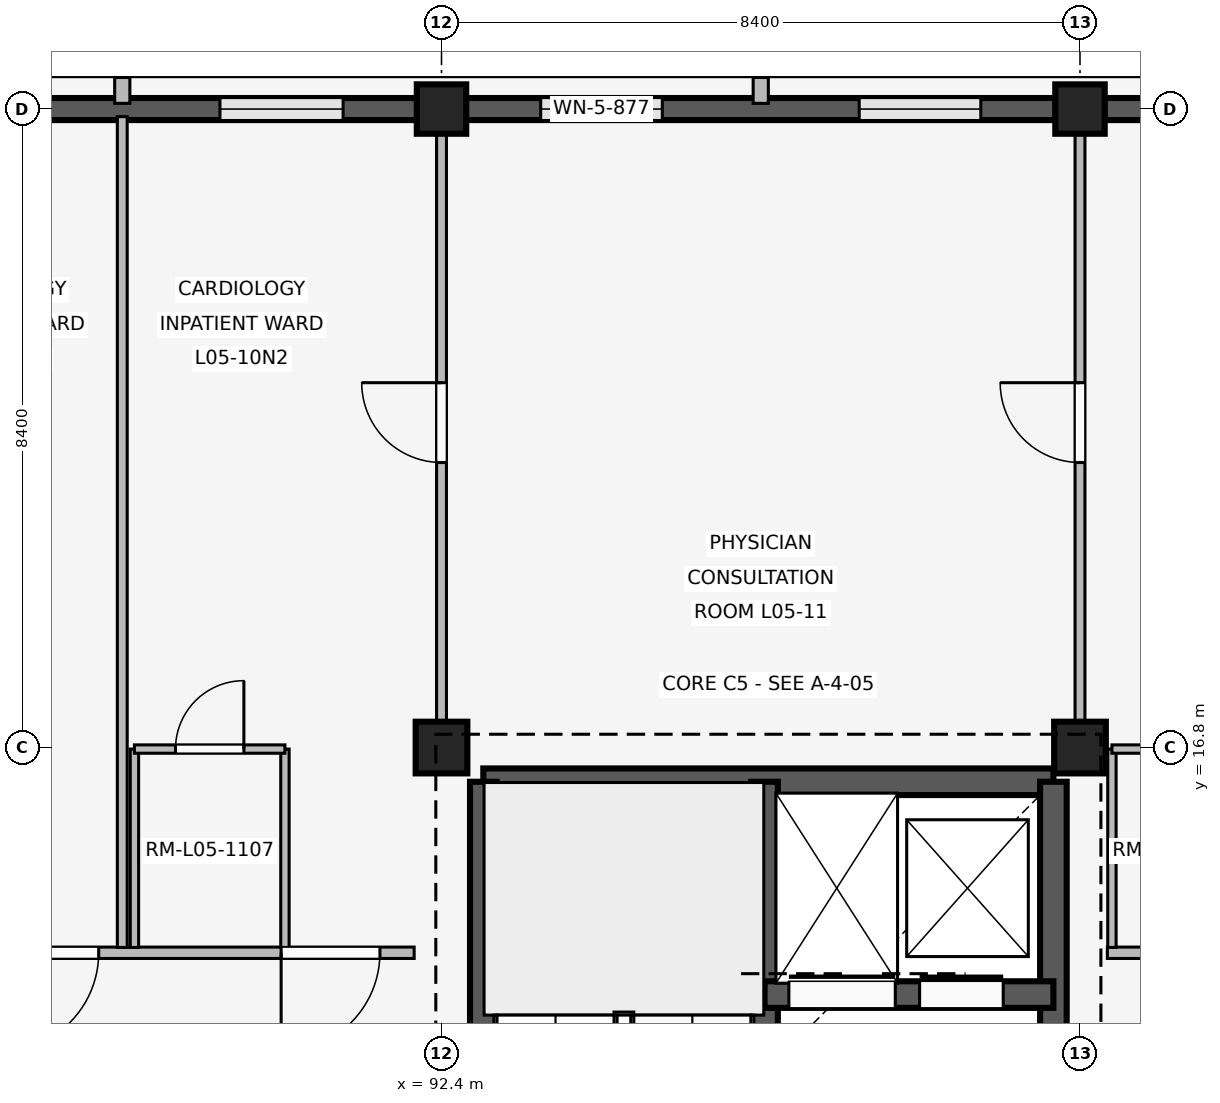
"""IFC4 building model, lengths in metres.
Left out: names, types, materials, properties, quantities, classifications, styles, units other than length and angle.
Written with IfcOpenShell. Run it as: python <this file> out.ifc"""

import sys

from ifc_helpers import new_model, si_unit, direction, frame, frame_2d, origin, origin_2d, place, context, subcontext, project, spatial, rectangle, extrude, element, fill, save


model = new_model("IFC4")
c1 = context("Model", 3, precision=1e-05, world=origin(), true_north=direction((0.0, 1.0)))
c2 = subcontext(c1, "Body", "Model", "MODEL_VIEW")
j1 = project(units=[si_unit("LENGTHUNIT", "METRE"), si_unit("PLANEANGLEUNIT", "RADIAN")], contexts=[c1])
p1 = place(None, origin())
s1 = spatial("IfcSite", under=j1, at=p1, CompositionType="ELEMENT")
p2 = place(p1, origin())
s2 = spatial("IfcBuilding", under=s1, at=p2, CompositionType="ELEMENT")
p3 = place(p2, frame((0.0, 0.0, 20.4)))
s3 = spatial("IfcBuildingStorey", under=s2, at=p3, CompositionType="ELEMENT", Elevation=20.4)
p4 = place(p3, frame((92.4, 16.8, 0.0), z_axis=(0.0, 0.0, 1.0), x_axis=(1.0, 0.0, 0.0)))
e1 = element("IfcColumn", 1, at=p4, inside=s3, PredefinedType="COLUMN", context=c2, shape_type="SweptSolid", body=[
    extrude(rectangle(XDim=0.68, YDim=0.68, at=origin_2d()), origin(), (0.0, 0.0, 1.0), 4.2),
])
p5 = place(p3, frame((92.4, 25.2, 0.0), z_axis=(0.0, 0.0, 1.0), x_axis=(1.0, 0.0, 0.0)))
e2 = element("IfcColumn", 2, at=p5, inside=s3, PredefinedType="COLUMN", context=c2, shape_type="SweptSolid", body=[
    extrude(rectangle(XDim=0.65, YDim=0.65, at=origin_2d()), origin(), (0.0, 0.0, 1.0), 4.2),
])
p6 = place(p3, frame((100.8, 16.8, 0.0), z_axis=(0.0, 0.0, 1.0), x_axis=(1.0, 0.0, 0.0)))
e3 = element("IfcColumn", 3, at=p6, inside=s3, PredefinedType="COLUMN", context=c2, shape_type="SweptSolid", body=[
    extrude(rectangle(XDim=0.68, YDim=0.68, at=origin_2d()), origin(), (0.0, 0.0, 1.0), 4.2),
])
p7 = place(p3, frame((100.8, 25.2, 0.0), z_axis=(0.0, 0.0, 1.0), x_axis=(1.0, 0.0, 0.0)))
e4 = element("IfcColumn", 4, at=p7, inside=s3, PredefinedType="COLUMN", context=c2, shape_type="SweptSolid", body=[
    extrude(rectangle(XDim=0.65, YDim=0.65, at=origin_2d()), origin(), (0.0, 0.0, 1.0), 4.2),
])
p8 = place(p3, frame((84.32, 25.2, 0.0), z_axis=(0.0, 0.0, 1.0), x_axis=(1.0, 0.0, 0.0)))
e5 = element("IfcWall", 5, at=p8, inside=s3, PredefinedType="SOLIDWALL", context=c2, shape_type="SweptSolid", body=[
    extrude(rectangle(XDim=7.76, YDim=0.29, at=frame_2d((3.88, 0.0))), origin(), (0.0, 0.0, 1.0), 3.34),
])
p9 = place(p8, frame((0.975, 0.0, 0.85)))
e6 = element("IfcOpeningElement", 6, at=p9, cuts=e5, PredefinedType="OPENING", context=c2, shape_type="SweptSolid", body=[
    extrude(rectangle(XDim=1.62, YDim=1.52, at=frame_2d((0.81, 0.76))), frame((0.0, 0.155, 0.0), z_axis=(0.0, -1.0, 0.0), x_axis=(1.0, 0.0, 0.0)), (0.0, 0.0, 1.0), 0.31),
])
p10 = place(p8, frame((5.165, 0.0, 0.85)))
e7 = element("IfcOpeningElement", 7, at=p10, cuts=e5, PredefinedType="OPENING", context=c2, shape_type="SweptSolid", body=[
    extrude(rectangle(XDim=1.62, YDim=1.52, at=frame_2d((0.81, 0.76))), frame((0.0, 0.155, 0.0), z_axis=(0.0, -1.0, 0.0), x_axis=(1.0, 0.0, 0.0)), (0.0, 0.0, 1.0), 0.31),
])
p11 = place(p3, frame((88.2, 25.275, 0.0), z_axis=(0.0, 0.0, 1.0), x_axis=(0.0, 1.0, 0.0)))
e8 = element("IfcWall", 8, at=p11, inside=s3, PredefinedType="ELEMENTEDWALL", context=c2, shape_type="SweptSolid", body=[
    extrude(rectangle(XDim=0.34, YDim=0.2, at=frame_2d((0.17, 0.0))), origin(), (0.0, 0.0, 1.0), 3.32),
])
p12 = place(p3, frame((92.72, 25.2, 0.0), z_axis=(0.0, 0.0, 1.0), x_axis=(1.0, 0.0, 0.0)))
e9 = element("IfcWall", 9, at=p12, inside=s3, PredefinedType="SOLIDWALL", context=c2, shape_type="SweptSolid", body=[
    extrude(rectangle(XDim=7.76, YDim=0.29, at=frame_2d((3.88, 0.0))), origin(), (0.0, 0.0, 1.0), 3.34),
])
p13 = place(p12, frame((0.985, 0.0, 0.85)))
e10 = element("IfcOpeningElement", 10, at=p13, cuts=e9, PredefinedType="OPENING", context=c2, shape_type="SweptSolid", body=[
    extrude(rectangle(XDim=1.6, YDim=1.65, at=frame_2d((0.8, 0.825))), frame((0.0, 0.155, 0.0), z_axis=(0.0, -1.0, 0.0), x_axis=(1.0, 0.0, 0.0)), (0.0, 0.0, 1.0), 0.31),
])
p14 = place(p12, frame((5.175, 0.0, 0.85)))
e11 = element("IfcOpeningElement", 11, at=p14, cuts=e9, PredefinedType="OPENING", context=c2, shape_type="SweptSolid", body=[
    extrude(rectangle(XDim=1.6, YDim=1.65, at=frame_2d((0.8, 0.825))), frame((0.0, 0.155, 0.0), z_axis=(0.0, -1.0, 0.0), x_axis=(1.0, 0.0, 0.0)), (0.0, 0.0, 1.0), 0.31),
])
p15 = place(p3, frame((96.6, 25.275, 0.0), z_axis=(0.0, 0.0, 1.0), x_axis=(0.0, 1.0, 0.0)))
e12 = element("IfcWall", 12, at=p15, inside=s3, PredefinedType="ELEMENTEDWALL", context=c2, shape_type="SweptSolid", body=[
    extrude(rectangle(XDim=0.34, YDim=0.2, at=frame_2d((0.17, 0.0))), origin(), (0.0, 0.0, 1.0), 3.32),
])
p16 = place(p3, frame((101.12, 25.2, 0.0), z_axis=(0.0, 0.0, 1.0), x_axis=(1.0, 0.0, 0.0)))
e13 = element("IfcWall", 13, at=p16, inside=s3, PredefinedType="SOLIDWALL", context=c2, shape_type="SweptSolid", body=[
    extrude(rectangle(XDim=7.76, YDim=0.29, at=frame_2d((3.88, 0.0))), origin(), (0.0, 0.0, 1.0), 3.34),
])
p17 = place(p16, frame((1.025, 0.0, 0.85)))
e14 = element("IfcOpeningElement", 14, at=p17, cuts=e13, PredefinedType="OPENING", context=c2, shape_type="SweptSolid", body=[
    extrude(rectangle(XDim=1.52, YDim=1.65, at=frame_2d((0.76, 0.825))), frame((0.0, 0.155, 0.0), z_axis=(0.0, -1.0, 0.0), x_axis=(1.0, 0.0, 0.0)), (0.0, 0.0, 1.0), 0.31),
])
p18 = place(p16, frame((5.215, 0.0, 0.85)))
e15 = element("IfcOpeningElement", 15, at=p18, cuts=e13, PredefinedType="OPENING", context=c2, shape_type="SweptSolid", body=[
    extrude(rectangle(XDim=1.52, YDim=1.65, at=frame_2d((0.76, 0.825))), frame((0.0, 0.155, 0.0), z_axis=(0.0, -1.0, 0.0), x_axis=(1.0, 0.0, 0.0)), (0.0, 0.0, 1.0), 0.31),
])
p19 = place(p3, frame((92.95, 16.35, 0.0), z_axis=(0.0, 0.0, 1.0), x_axis=(1.0, 0.0, 0.0)))
e16 = element("IfcWall", 16, at=p19, inside=s3, PredefinedType="SHEAR", context=c2, shape_type="SweptSolid", body=[
    extrude(rectangle(XDim=7.5, YDim=0.35, at=frame_2d((3.75, 0.0))), origin(), (0.0, 0.0, 1.0), 3.92),
])
p20 = place(p3, frame((92.95, 8.8, 0.0), z_axis=(0.0, 0.0, 1.0), x_axis=(0.0, 1.0, 0.0)))
e17 = element("IfcWall", 17, at=p20, inside=s3, PredefinedType="SHEAR", context=c2, shape_type="SweptSolid", body=[
    extrude(rectangle(XDim=7.55, YDim=0.35, at=frame_2d((3.775, 0.0))), origin(), (0.0, 0.0, 1.0), 3.92),
])
p21 = place(p20, frame((0.28, 0.0, 0.0)))
e18 = element("IfcOpeningElement", 18, at=p21, cuts=e17, PredefinedType="OPENING", context=c2, shape_type="SweptSolid", body=[
    extrude(rectangle(XDim=1.0, YDim=2.15, at=frame_2d((0.5, 1.075))), frame((0.0, 0.185, 0.0), z_axis=(0.0, -1.0, 0.0), x_axis=(1.0, 0.0, 0.0)), (0.0, 0.0, 1.0), 0.37),
])
p22 = place(p3, frame((100.45, 8.8, 0.0), z_axis=(0.0, 0.0, 1.0), x_axis=(0.0, 1.0, 0.0)))
e19 = element("IfcWall", 19, at=p22, inside=s3, PredefinedType="SHEAR", context=c2, shape_type="SweptSolid", body=[
    extrude(rectangle(XDim=7.55, YDim=0.35, at=frame_2d((3.775, 0.0))), origin(), (0.0, 0.0, 1.0), 3.92),
])
p23 = place(p22, frame((2.4, 0.0, 0.0)))
e20 = element("IfcOpeningElement", 20, at=p23, cuts=e19, PredefinedType="OPENING", context=c2, shape_type="SweptSolid", body=[
    extrude(rectangle(XDim=1.2, YDim=2.2, at=frame_2d((0.6, 1.1))), frame((0.0, 0.185, 0.0), z_axis=(0.0, -1.0, 0.0), x_axis=(1.0, 0.0, 0.0)), (0.0, 0.0, 1.0), 0.37),
])
p24 = place(p3, frame((96.65, 8.8, 0.0), z_axis=(0.0, 0.0, 1.0), x_axis=(0.0, 1.0, 0.0)))
e21 = element("IfcWall", 21, at=p24, inside=s3, PredefinedType="SHEAR", context=c2, shape_type="SweptSolid", body=[
    extrude(rectangle(XDim=7.55, YDim=0.35, at=frame_2d((3.775, 0.0))), origin(), (0.0, 0.0, 1.0), 3.92),
])
p25 = place(p24, frame((0.28, 0.0, 0.0)))
e22 = element("IfcOpeningElement", 22, at=p25, cuts=e21, PredefinedType="OPENING", context=c2, shape_type="SweptSolid", body=[
    extrude(rectangle(XDim=1.0, YDim=2.15, at=frame_2d((0.5, 1.075))), frame((0.0, 0.185, 0.0), z_axis=(0.0, -1.0, 0.0), x_axis=(1.0, 0.0, 0.0)), (0.0, 0.0, 1.0), 0.37),
])
p26 = place(p3, frame((96.65, 13.55, 0.0), z_axis=(0.0, 0.0, 1.0), x_axis=(1.0, 0.0, 0.0)))
e23 = element("IfcWall", 23, at=p26, inside=s3, PredefinedType="SHEAR", context=c2, shape_type="SweptSolid", body=[
    extrude(rectangle(XDim=3.8, YDim=0.35, at=frame_2d((1.9, 0.0))), origin(), (0.0, 0.0, 1.0), 3.92),
])
p27 = place(p26, frame((0.32, 0.0, 0.0)))
e24 = element("IfcOpeningElement", 24, at=p27, cuts=e23, PredefinedType="OPENING", context=c2, shape_type="SweptSolid", body=[
    extrude(rectangle(XDim=1.4, YDim=2.25, at=frame_2d((0.7, 1.125))), frame((0.0, 0.185, 0.0), z_axis=(0.0, -1.0, 0.0), x_axis=(1.0, 0.0, 0.0)), (0.0, 0.0, 1.0), 0.37),
])
p28 = place(p26, frame((2.04, 0.0, 0.0)))
e25 = element("IfcOpeningElement", 25, at=p28, cuts=e23, PredefinedType="OPENING", context=c2, shape_type="SweptSolid", body=[
    extrude(rectangle(XDim=1.1, YDim=2.15, at=frame_2d((0.55, 1.075))), frame((0.0, 0.185, 0.0), z_axis=(0.0, -1.0, 0.0), x_axis=(1.0, 0.0, 0.0)), (0.0, 0.0, 1.0), 0.37),
])
p29 = place(p3, frame((92.04, 14.1, 0.0), z_axis=(0.0, 0.0, 1.0), x_axis=(-1.0, 0.0, 0.0)))
e26 = element("IfcWall", 26, at=p29, inside=s3, PredefinedType="PARTITIONING", context=c2, shape_type="SweptSolid", body=[
    extrude(rectangle(XDim=7.96, YDim=0.15, at=frame_2d((3.98, 0.0))), origin(), (0.0, 0.0, 1.0), 3.32),
])
p30 = place(p29, frame((0.45, 0.0, 0.0)))
e27 = element("IfcOpeningElement", 27, at=p30, cuts=e26, PredefinedType="OPENING", context=c2, shape_type="SweptSolid", body=[
    extrude(rectangle(XDim=1.3, YDim=2.25, at=frame_2d((0.65, 1.125))), frame((0.0, 0.085, 0.0), z_axis=(0.0, -1.0, 0.0), x_axis=(1.0, 0.0, 0.0)), (0.0, 0.0, 1.0), 0.17),
])
p31 = place(p29, frame((4.15, 0.0, 0.0)))
e28 = element("IfcOpeningElement", 28, at=p31, cuts=e26, PredefinedType="OPENING", context=c2, shape_type="SweptSolid", body=[
    extrude(rectangle(XDim=1.3, YDim=2.25, at=frame_2d((0.65, 1.125))), frame((0.0, 0.085, 0.0), z_axis=(0.0, -1.0, 0.0), x_axis=(1.0, 0.0, 0.0)), (0.0, 0.0, 1.0), 0.17),
])
p32 = place(p3, frame((88.2, 14.17, 0.0), z_axis=(0.0, 0.0, 1.0), x_axis=(0.0, 1.0, 0.0)))
e29 = element("IfcWall", 29, at=p32, inside=s3, PredefinedType="PARTITIONING", context=c2, shape_type="SweptSolid", body=[
    extrude(rectangle(XDim=10.93, YDim=0.13, at=frame_2d((5.465, 0.0))), origin(), (0.0, 0.0, 1.0), 3.32),
])
for number, where, z_axis, x_axis in (
    (30, (88.36, 14.17, 0.0), (0.0, 0.0, 1.0), (0.0, 1.0, 0.0)),
    (31, (90.34, 14.17, 0.0), (0.0, 0.0, 1.0), (0.0, 1.0, 0.0)),
):
    element("IfcWall", number, at=place(p3, frame(where, z_axis=z_axis, x_axis=x_axis)), inside=s3, PredefinedType="PARTITIONING", context=c2, shape_type="SweptSolid", body=[
        extrude(rectangle(XDim=2.61, YDim=0.11, at=frame_2d((1.305, 0.0))), origin(), (0.0, 0.0, 1.0), 3.32),
    ])
p33 = place(p3, frame((88.36, 16.78, 0.0), z_axis=(0.0, 0.0, 1.0), x_axis=(1.0, 0.0, 0.0)))
e32 = element("IfcWall", 32, at=p33, inside=s3, PredefinedType="PARTITIONING", context=c2, shape_type="SweptSolid", body=[
    extrude(rectangle(XDim=1.98, YDim=0.11, at=frame_2d((0.99, 0.0))), origin(), (0.0, 0.0, 1.0), 3.32),
])
p34 = place(p33, frame((0.54, 0.0, 0.0)))
e33 = element("IfcOpeningElement", 33, at=p34, cuts=e32, PredefinedType="OPENING", context=c2, shape_type="SweptSolid", body=[
    extrude(rectangle(XDim=0.9, YDim=2.1, at=frame_2d((0.45, 1.05))), frame((0.0, 0.065, 0.0), z_axis=(0.0, -1.0, 0.0), x_axis=(1.0, 0.0, 0.0)), (0.0, 0.0, 1.0), 0.13),
])
p35 = place(p3, frame((92.4, 17.15, 0.0), z_axis=(0.0, 0.0, 1.0), x_axis=(0.0, 1.0, 0.0)))
e34 = element("IfcWall", 34, at=p35, inside=s3, PredefinedType="PARTITIONING", context=c2, shape_type="SweptSolid", body=[
    extrude(rectangle(XDim=7.91, YDim=0.13, at=frame_2d((3.955, 0.0))), origin(), (0.0, 0.0, 1.0), 3.32),
])
p36 = place(p35, frame((3.4, 0.0, 0.0)))
e35 = element("IfcOpeningElement", 35, at=p36, cuts=e34, PredefinedType="OPENING", context=c2, shape_type="SweptSolid", body=[
    extrude(rectangle(XDim=1.05, YDim=2.2, at=frame_2d((0.525, 1.1))), frame((0.0, 0.075, 0.0), z_axis=(0.0, -1.0, 0.0), x_axis=(1.0, 0.0, 0.0)), (0.0, 0.0, 1.0), 0.15),
])
p37 = place(p3, frame((100.8, 17.15, 0.0), z_axis=(0.0, 0.0, 1.0), x_axis=(0.0, 1.0, 0.0)))
e36 = element("IfcWall", 36, at=p37, inside=s3, PredefinedType="PARTITIONING", context=c2, shape_type="SweptSolid", body=[
    extrude(rectangle(XDim=7.91, YDim=0.13, at=frame_2d((3.955, 0.0))), origin(), (0.0, 0.0, 1.0), 3.32),
])
p38 = place(p37, frame((3.4, 0.0, 0.0)))
e37 = element("IfcOpeningElement", 37, at=p38, cuts=e36, PredefinedType="OPENING", context=c2, shape_type="SweptSolid", body=[
    extrude(rectangle(XDim=1.05, YDim=2.2, at=frame_2d((0.525, 1.1))), frame((0.0, 0.075, 0.0), z_axis=(0.0, -1.0, 0.0), x_axis=(1.0, 0.0, 0.0)), (0.0, 0.0, 1.0), 0.15),
])
p39 = place(p3, frame((109.12, 14.1, 0.0), z_axis=(0.0, 0.0, 1.0), x_axis=(-1.0, 0.0, 0.0)))
e38 = element("IfcWall", 38, at=p39, inside=s3, PredefinedType="PARTITIONING", context=c2, shape_type="SweptSolid", body=[
    extrude(rectangle(XDim=7.96, YDim=0.15, at=frame_2d((3.98, 0.0))), origin(), (0.0, 0.0, 1.0), 3.32),
])
p40 = place(p39, frame((0.73, 0.0, 0.0)))
e39 = element("IfcOpeningElement", 39, at=p40, cuts=e38, PredefinedType="OPENING", context=c2, shape_type="SweptSolid", body=[
    extrude(rectangle(XDim=1.3, YDim=2.25, at=frame_2d((0.65, 1.125))), frame((0.0, 0.085, 0.0), z_axis=(0.0, -1.0, 0.0), x_axis=(1.0, 0.0, 0.0)), (0.0, 0.0, 1.0), 0.17),
])
p41 = place(p39, frame((4.43, 0.0, 0.0)))
e40 = element("IfcOpeningElement", 40, at=p41, cuts=e38, PredefinedType="OPENING", context=c2, shape_type="SweptSolid", body=[
    extrude(rectangle(XDim=1.3, YDim=2.25, at=frame_2d((0.65, 1.125))), frame((0.0, 0.085, 0.0), z_axis=(0.0, -1.0, 0.0), x_axis=(1.0, 0.0, 0.0)), (0.0, 0.0, 1.0), 0.17),
])
p42 = place(p3, frame((101.22, 14.17, 0.0), z_axis=(0.0, 0.0, 1.0), x_axis=(0.0, 1.0, 0.0)))
e41 = element("IfcWall", 41, at=p42, inside=s3, PredefinedType="PARTITIONING", context=c2, shape_type="SweptSolid", body=[
    extrude(rectangle(XDim=2.61, YDim=0.11, at=frame_2d((1.305, 0.0))), origin(), (0.0, 0.0, 1.0), 3.32),
])
p43 = place(p3, frame((101.22, 16.78, 0.0), z_axis=(0.0, 0.0, 1.0), x_axis=(1.0, 0.0, 0.0)))
e42 = element("IfcWall", 42, at=p43, inside=s3, PredefinedType="PARTITIONING", context=c2, shape_type="SweptSolid", body=[
    extrude(rectangle(XDim=1.98, YDim=0.11, at=frame_2d((0.99, 0.0))), origin(), (0.0, 0.0, 1.0), 3.32),
])
p44 = place(p43, frame((0.54, 0.0, 0.0)))
e43 = element("IfcOpeningElement", 43, at=p44, cuts=e42, PredefinedType="OPENING", context=c2, shape_type="SweptSolid", body=[
    extrude(rectangle(XDim=0.9, YDim=2.1, at=frame_2d((0.45, 1.05))), frame((0.0, 0.065, 0.0), z_axis=(0.0, -1.0, 0.0), x_axis=(1.0, 0.0, 0.0)), (0.0, 0.0, 1.0), 0.13),
])
p45 = place(p10, origin())
e44 = element("IfcWindow", 44, at=p45, inside=s3, PartitioningType="SINGLE_PANEL", PredefinedType="WINDOW", context=c2, shape_type="SweptSolid", body=[
    extrude(rectangle(XDim=1.62, YDim=1.52, at=frame_2d((0.81, 0.76))), frame((0.0, 0.03, 0.0), z_axis=(0.0, -1.0, 0.0), x_axis=(1.0, 0.0, 0.0)), (0.0, 0.0, 1.0), 0.06),
])
fill(e7, e44)
p46 = place(p13, origin())
e45 = element("IfcWindow", 45, at=p46, inside=s3, PartitioningType="SINGLE_PANEL", PredefinedType="WINDOW", context=c2, shape_type="SweptSolid", body=[
    extrude(rectangle(XDim=1.6, YDim=1.65, at=frame_2d((0.8, 0.825))), frame((0.0, 0.03, 0.0), z_axis=(0.0, -1.0, 0.0), x_axis=(1.0, 0.0, 0.0)), (0.0, 0.0, 1.0), 0.06),
])
fill(e10, e45)
p47 = place(p14, origin())
e46 = element("IfcWindow", 46, at=p47, inside=s3, PartitioningType="SINGLE_PANEL", PredefinedType="WINDOW", context=c2, shape_type="SweptSolid", body=[
    extrude(rectangle(XDim=1.6, YDim=1.65, at=frame_2d((0.8, 0.825))), frame((0.0, 0.03, 0.0), z_axis=(0.0, -1.0, 0.0), x_axis=(1.0, 0.0, 0.0)), (0.0, 0.0, 1.0), 0.06),
])
fill(e11, e46)
p48 = place(p27, origin())
e47 = element("IfcDoor", 47, at=p48, inside=s3, OperationType="SLIDING_TO_LEFT", PredefinedType="DOOR", context=c2, shape_type="SweptSolid", body=[
    extrude(rectangle(XDim=1.4, YDim=2.25, at=frame_2d((0.7, 1.125))), frame((0.0, 0.025, 0.0), z_axis=(0.0, -1.0, 0.0), x_axis=(1.0, 0.0, 0.0)), (0.0, 0.0, 1.0), 0.05),
])
fill(e24, e47)
p49 = place(p28, origin())
e48 = element("IfcDoor", 48, at=p49, inside=s3, OperationType="SLIDING_TO_LEFT", PredefinedType="DOOR", context=c2, shape_type="SweptSolid", body=[
    extrude(rectangle(XDim=1.1, YDim=2.15, at=frame_2d((0.55, 1.075))), frame((0.0, 0.025, 0.0), z_axis=(0.0, -1.0, 0.0), x_axis=(1.0, 0.0, 0.0)), (0.0, 0.0, 1.0), 0.05),
])
fill(e25, e48)
p50 = place(p30, origin())
e49 = element("IfcDoor", 49, at=p50, inside=s3, OperationType="SINGLE_SWING_RIGHT", PredefinedType="DOOR", context=c2, shape_type="SweptSolid", body=[
    extrude(rectangle(XDim=1.3, YDim=2.25, at=frame_2d((0.65, 1.125))), frame((0.0, 0.025, 0.0), z_axis=(0.0, -1.0, 0.0), x_axis=(1.0, 0.0, 0.0)), (0.0, 0.0, 1.0), 0.05),
])
fill(e27, e49)
p51 = place(p31, origin())
e50 = element("IfcDoor", 50, at=p51, inside=s3, OperationType="SINGLE_SWING_RIGHT", PredefinedType="DOOR", context=c2, shape_type="SweptSolid", body=[
    extrude(rectangle(XDim=1.3, YDim=2.25, at=frame_2d((0.65, 1.125))), frame((0.0, 0.025, 0.0), z_axis=(0.0, -1.0, 0.0), x_axis=(1.0, 0.0, 0.0)), (0.0, 0.0, 1.0), 0.05),
])
fill(e28, e50)
p52 = place(p34, origin())
e51 = element("IfcDoor", 51, at=p52, inside=s3, OperationType="SINGLE_SWING_RIGHT", PredefinedType="DOOR", context=c2, shape_type="SweptSolid", body=[
    extrude(rectangle(XDim=0.9, YDim=2.1, at=frame_2d((0.45, 1.05))), frame((0.0, 0.025, 0.0), z_axis=(0.0, -1.0, 0.0), x_axis=(1.0, 0.0, 0.0)), (0.0, 0.0, 1.0), 0.05),
])
fill(e33, e51)
p53 = place(p36, origin())
e52 = element("IfcDoor", 52, at=p53, inside=s3, OperationType="SINGLE_SWING_RIGHT", PredefinedType="DOOR", context=c2, shape_type="SweptSolid", body=[
    extrude(rectangle(XDim=1.05, YDim=2.2, at=frame_2d((0.525, 1.1))), frame((0.0, 0.025, 0.0), z_axis=(0.0, -1.0, 0.0), x_axis=(1.0, 0.0, 0.0)), (0.0, 0.0, 1.0), 0.05),
])
fill(e35, e52)
p54 = place(p38, origin())
e53 = element("IfcDoor", 53, at=p54, inside=s3, OperationType="SINGLE_SWING_RIGHT", PredefinedType="DOOR", context=c2, shape_type="SweptSolid", body=[
    extrude(rectangle(XDim=1.05, YDim=2.2, at=frame_2d((0.525, 1.1))), frame((0.0, 0.025, 0.0), z_axis=(0.0, -1.0, 0.0), x_axis=(1.0, 0.0, 0.0)), (0.0, 0.0, 1.0), 0.05),
])
fill(e37, e53)
save(model, sys.argv[1])
